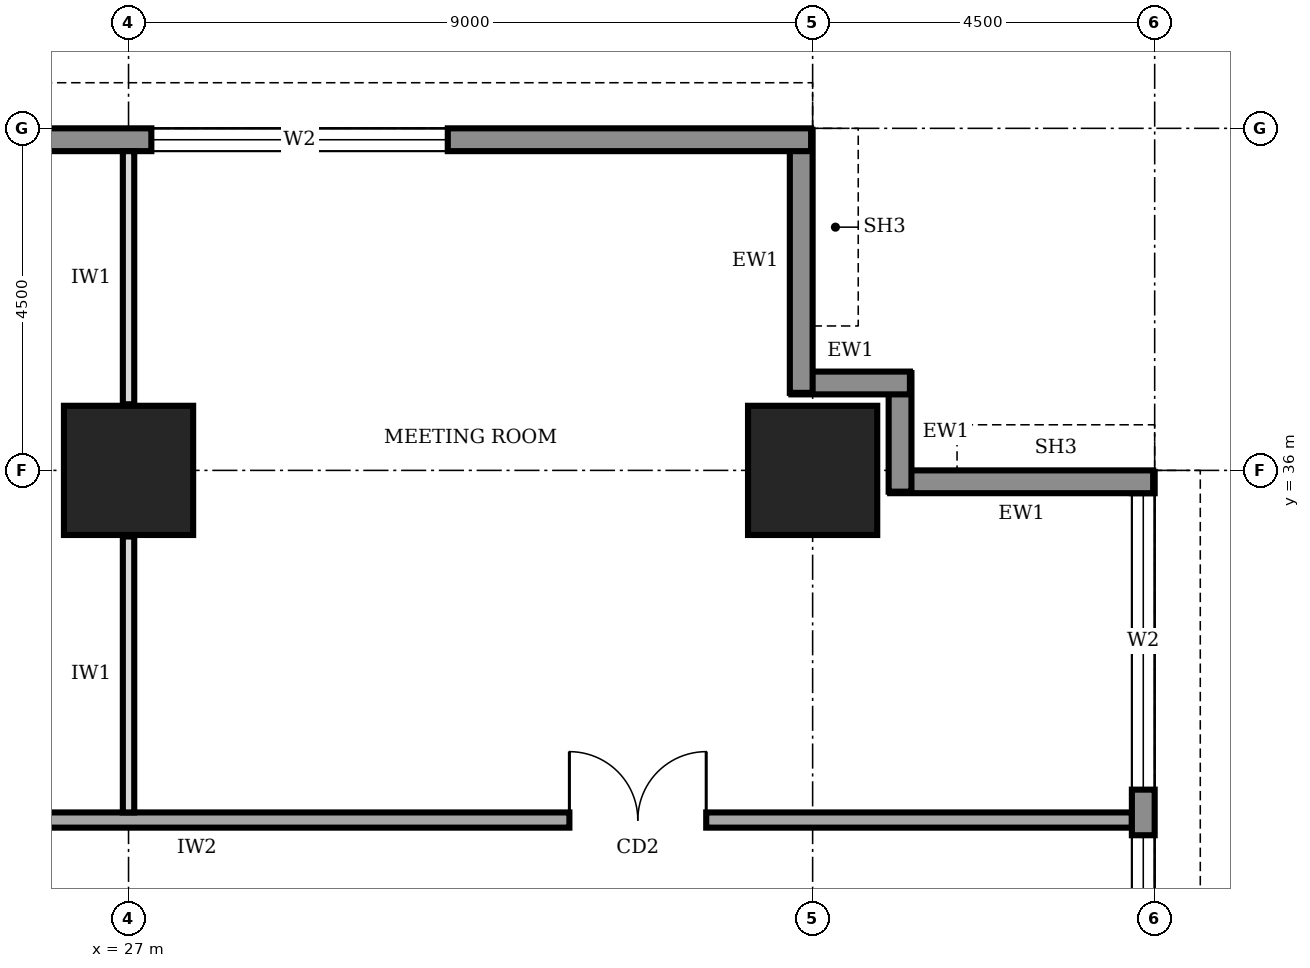
"""IFC4 building model, lengths in metres.
Left out: names, types, materials, properties, quantities, classifications, styles, units other than length and angle.
Written with IfcOpenShell. Run it as: python <this file> out.ifc"""

import sys

from ifc_helpers import new_model, si_unit, direction, frame, frame_2d, origin, origin_2d, place, context, subcontext, project, spatial, rectangle, extrude, element, fill, save


model = new_model("IFC4")
c1 = context("Model", 3, precision=1e-05, world=origin(), true_north=direction((0.0, 1.0)))
c2 = subcontext(c1, "Body", "Model", "MODEL_VIEW")
j1 = project(units=[si_unit("LENGTHUNIT", "METRE"), si_unit("PLANEANGLEUNIT", "RADIAN")], contexts=[c1])
p1 = place(None, origin())
s1 = spatial("IfcSite", under=j1, at=p1, CompositionType="ELEMENT")
p2 = place(p1, origin())
s2 = spatial("IfcBuilding", under=s1, at=p2, CompositionType="ELEMENT")
p3 = place(p2, frame((0.0, 0.0, 141.0)))
s3 = spatial("IfcBuildingStorey", under=s2, at=p3, CompositionType="ELEMENT", Elevation=141.0)
for number, where, z_axis, x_axis in (
    (1, (27.0, 36.0, 0.0), (0.0, 0.0, 1.0), (1.0, 0.0, 0.0)),
    (2, (36.0, 36.0, 0.0), (0.0, 0.0, 1.0), (1.0, 0.0, 0.0)),
):
    element("IfcColumn", number, at=place(p3, frame(where, z_axis=z_axis, x_axis=x_axis)), inside=s3, PredefinedType="COLUMN", context=c2, shape_type="SweptSolid", body=[
        extrude(rectangle(XDim=1.7, YDim=1.7, at=origin_2d()), origin(), (0.0, 0.0, 1.0), 4.0),
    ])
p4 = place(p3, frame((40.35, 4.52, 0.0), z_axis=(0.0, 0.0, 1.0), x_axis=(0.0, 1.0, 0.0)))
e3 = element("IfcWall", 3, at=p4, inside=s3, PredefinedType="STANDARD", context=c2, shape_type="SweptSolid", body=[
    extrude(rectangle(XDim=31.46, YDim=0.3, at=frame_2d((15.73, 0.0))), origin(), (0.0, 0.0, 1.0), 3.75),
])
p5 = place(p4, frame((4.78, 0.0, 0.6)))
e4 = element("IfcOpeningElement", 4, at=p5, cuts=e3, PredefinedType="OPENING", context=c2, shape_type="SweptSolid", body=[
    extrude(rectangle(XDim=3.9, YDim=2.6, at=frame_2d((1.95, 1.3))), frame((0.0, 0.16, 0.0), z_axis=(0.0, -1.0, 0.0), x_axis=(1.0, 0.0, 0.0)), (0.0, 0.0, 1.0), 0.32),
])
p6 = place(p4, frame((9.28, 0.0, 0.6)))
e5 = element("IfcOpeningElement", 5, at=p6, cuts=e3, PredefinedType="OPENING", context=c2, shape_type="SweptSolid", body=[
    extrude(rectangle(XDim=3.9, YDim=2.6, at=frame_2d((1.95, 1.3))), frame((0.0, 0.16, 0.0), z_axis=(0.0, -1.0, 0.0), x_axis=(1.0, 0.0, 0.0)), (0.0, 0.0, 1.0), 0.32),
])
p7 = place(p4, frame((13.78, 0.0, 0.6)))
e6 = element("IfcOpeningElement", 6, at=p7, cuts=e3, PredefinedType="OPENING", context=c2, shape_type="SweptSolid", body=[
    extrude(rectangle(XDim=3.9, YDim=2.6, at=frame_2d((1.95, 1.3))), frame((0.0, 0.16, 0.0), z_axis=(0.0, -1.0, 0.0), x_axis=(1.0, 0.0, 0.0)), (0.0, 0.0, 1.0), 0.32),
])
p8 = place(p4, frame((18.28, 0.0, 0.6)))
e7 = element("IfcOpeningElement", 7, at=p8, cuts=e3, PredefinedType="OPENING", context=c2, shape_type="SweptSolid", body=[
    extrude(rectangle(XDim=3.9, YDim=2.6, at=frame_2d((1.95, 1.3))), frame((0.0, 0.16, 0.0), z_axis=(0.0, -1.0, 0.0), x_axis=(1.0, 0.0, 0.0)), (0.0, 0.0, 1.0), 0.32),
])
p9 = place(p4, frame((22.78, 0.0, 0.6)))
e8 = element("IfcOpeningElement", 8, at=p9, cuts=e3, PredefinedType="OPENING", context=c2, shape_type="SweptSolid", body=[
    extrude(rectangle(XDim=3.9, YDim=2.6, at=frame_2d((1.95, 1.3))), frame((0.0, 0.16, 0.0), z_axis=(0.0, -1.0, 0.0), x_axis=(1.0, 0.0, 0.0)), (0.0, 0.0, 1.0), 0.32),
])
p10 = place(p4, frame((27.28, 0.0, 0.6)))
e9 = element("IfcOpeningElement", 9, at=p10, cuts=e3, PredefinedType="OPENING", context=c2, shape_type="SweptSolid", body=[
    extrude(rectangle(XDim=3.9, YDim=2.6, at=frame_2d((1.95, 1.3))), frame((0.0, 0.16, 0.0), z_axis=(0.0, -1.0, 0.0), x_axis=(1.0, 0.0, 0.0)), (0.0, 0.0, 1.0), 0.32),
])
p11 = place(p3, frame((40.48, 35.85, 0.0), z_axis=(0.0, 0.0, 1.0), x_axis=(-1.0, 0.0, 0.0)))
e10 = element("IfcWall", 10, at=p11, inside=s3, PredefinedType="STANDARD", context=c2, shape_type="SweptSolid", body=[
    extrude(rectangle(XDim=3.46, YDim=0.3, at=frame_2d((1.73, 0.0))), origin(), (0.0, 0.0, 1.0), 2.85),
])
for number, where, z_axis, x_axis in (
    (11, (37.15, 35.72, 0.0), (0.0, 0.0, 1.0), (0.0, 1.0, 0.0)),
    (12, (37.28, 37.15, 0.0), (0.0, 0.0, 1.0), (-1.0, 0.0, 0.0)),
):
    element("IfcWall", number, at=place(p3, frame(where, z_axis=z_axis, x_axis=x_axis)), inside=s3, PredefinedType="STANDARD", context=c2, shape_type="SweptSolid", body=[
        extrude(rectangle(XDim=1.56, YDim=0.3, at=frame_2d((0.78, 0.0))), origin(), (0.0, 0.0, 1.0), 3.75),
    ])
p12 = place(p3, frame((35.85, 37.02, 0.0), z_axis=(0.0, 0.0, 1.0), x_axis=(0.0, 1.0, 0.0)))
e13 = element("IfcWall", 13, at=p12, inside=s3, PredefinedType="STANDARD", context=c2, shape_type="SweptSolid", body=[
    extrude(rectangle(XDim=3.46, YDim=0.3, at=frame_2d((1.73, 0.0))), origin(), (0.0, 0.0, 1.0), 2.85),
])
p13 = place(p3, frame((35.98, 40.35, 0.0), z_axis=(0.0, 0.0, 1.0), x_axis=(-1.0, 0.0, 0.0)))
e14 = element("IfcWall", 14, at=p13, inside=s3, PredefinedType="STANDARD", context=c2, shape_type="SweptSolid", body=[
    extrude(rectangle(XDim=31.46, YDim=0.3, at=frame_2d((15.73, 0.0))), origin(), (0.0, 0.0, 1.0), 3.75),
])
p14 = place(p13, frame((27.28, 0.0, 0.6)))
e15 = element("IfcOpeningElement", 15, at=p14, cuts=e14, PredefinedType="OPENING", context=c2, shape_type="SweptSolid", body=[
    extrude(rectangle(XDim=3.9, YDim=2.6, at=frame_2d((1.95, 1.3))), frame((0.0, 0.16, 0.0), z_axis=(0.0, -1.0, 0.0), x_axis=(1.0, 0.0, 0.0)), (0.0, 0.0, 1.0), 0.32),
])
p15 = place(p13, frame((22.78, 0.0, 0.6)))
e16 = element("IfcOpeningElement", 16, at=p15, cuts=e14, PredefinedType="OPENING", context=c2, shape_type="SweptSolid", body=[
    extrude(rectangle(XDim=3.9, YDim=2.6, at=frame_2d((1.95, 1.3))), frame((0.0, 0.16, 0.0), z_axis=(0.0, -1.0, 0.0), x_axis=(1.0, 0.0, 0.0)), (0.0, 0.0, 1.0), 0.32),
])
p16 = place(p13, frame((4.78, 0.0, 0.6)))
e17 = element("IfcOpeningElement", 17, at=p16, cuts=e14, PredefinedType="OPENING", context=c2, shape_type="SweptSolid", body=[
    extrude(rectangle(XDim=3.9, YDim=2.6, at=frame_2d((1.95, 1.3))), frame((0.0, 0.16, 0.0), z_axis=(0.0, -1.0, 0.0), x_axis=(1.0, 0.0, 0.0)), (0.0, 0.0, 1.0), 0.32),
])
p17 = place(p3, frame((40.2, 31.4, 0.0), z_axis=(0.0, 0.0, 1.0), x_axis=(-1.0, 0.0, 0.0)))
e18 = element("IfcWall", 18, at=p17, inside=s3, PredefinedType="SOLIDWALL", context=c2, shape_type="SweptSolid", body=[
    extrude(rectangle(XDim=28.5, YDim=0.2, at=frame_2d((14.25, 0.0))), origin(), (0.0, 0.0, 1.0), 3.75),
])
p18 = place(p17, frame((27.2, 0.0, 0.0)))
e19 = element("IfcOpeningElement", 19, at=p18, cuts=e18, PredefinedType="OPENING", context=c2, shape_type="SweptSolid", body=[
    extrude(rectangle(XDim=1.0, YDim=2.1, at=frame_2d((0.5, 1.05))), frame((0.0, 0.11, 0.0), z_axis=(0.0, -1.0, 0.0), x_axis=(1.0, 0.0, 0.0)), (0.0, 0.0, 1.0), 0.22),
])
p19 = place(p17, frame((23.95, 0.0, 0.0)))
e20 = element("IfcOpeningElement", 20, at=p19, cuts=e18, PredefinedType="OPENING", context=c2, shape_type="SweptSolid", body=[
    extrude(rectangle(XDim=1.0, YDim=2.1, at=frame_2d((0.5, 1.05))), frame((0.0, 0.11, 0.0), z_axis=(0.0, -1.0, 0.0), x_axis=(1.0, 0.0, 0.0)), (0.0, 0.0, 1.0), 0.22),
])
p20 = place(p17, frame((17.2, 0.0, 0.0)))
e21 = element("IfcOpeningElement", 21, at=p20, cuts=e18, PredefinedType="OPENING", context=c2, shape_type="SweptSolid", body=[
    extrude(rectangle(XDim=1.0, YDim=2.1, at=frame_2d((0.5, 1.05))), frame((0.0, 0.11, 0.0), z_axis=(0.0, -1.0, 0.0), x_axis=(1.0, 0.0, 0.0)), (0.0, 0.0, 1.0), 0.22),
])
p21 = place(p17, frame((5.6, 0.0, 0.0)))
e22 = element("IfcOpeningElement", 22, at=p21, cuts=e18, PredefinedType="OPENING", context=c2, shape_type="SweptSolid", body=[
    extrude(rectangle(XDim=1.8, YDim=2.1, at=frame_2d((0.9, 1.05))), frame((0.0, 0.11, 0.0), z_axis=(0.0, -1.0, 0.0), x_axis=(1.0, 0.0, 0.0)), (0.0, 0.0, 1.0), 0.22),
])
p22 = place(p3, frame((27.0, 31.5, 0.0), z_axis=(0.0, 0.0, 1.0), x_axis=(0.0, 1.0, 0.0)))
e23 = element("IfcWall", 23, at=p22, inside=s3, PredefinedType="PARTITIONING", context=c2, shape_type="SweptSolid", body=[
    extrude(rectangle(XDim=3.63, YDim=0.15, at=frame_2d((1.815, 0.0))), origin(), (0.0, 0.0, 1.0), 2.85),
])
p23 = place(p3, frame((27.0, 36.87, 0.0), z_axis=(0.0, 0.0, 1.0), x_axis=(0.0, 1.0, 0.0)))
e24 = element("IfcWall", 24, at=p23, inside=s3, PredefinedType="PARTITIONING", context=c2, shape_type="SweptSolid", body=[
    extrude(rectangle(XDim=3.33, YDim=0.15, at=frame_2d((1.665, 0.0))), origin(), (0.0, 0.0, 1.0), 2.85),
])
p24 = place(p9, origin())
e25 = element("IfcWindow", 25, at=p24, inside=s3, PartitioningType="SINGLE_PANEL", PredefinedType="WINDOW", context=c2, shape_type="SweptSolid", body=[
    extrude(rectangle(XDim=3.9, YDim=2.6, at=frame_2d((1.95, 1.3))), frame((0.0, 0.03, 0.0), z_axis=(0.0, -1.0, 0.0), x_axis=(1.0, 0.0, 0.0)), (0.0, 0.0, 1.0), 0.06),
])
fill(e8, e25)
p25 = place(p10, origin())
e26 = element("IfcWindow", 26, at=p25, inside=s3, PartitioningType="SINGLE_PANEL", PredefinedType="WINDOW", context=c2, shape_type="SweptSolid", body=[
    extrude(rectangle(XDim=3.9, YDim=2.6, at=frame_2d((1.95, 1.3))), frame((0.0, 0.03, 0.0), z_axis=(0.0, -1.0, 0.0), x_axis=(1.0, 0.0, 0.0)), (0.0, 0.0, 1.0), 0.06),
])
fill(e9, e26)
p26 = place(p16, origin())
e27 = element("IfcWindow", 27, at=p26, inside=s3, PartitioningType="SINGLE_PANEL", PredefinedType="WINDOW", context=c2, shape_type="SweptSolid", body=[
    extrude(rectangle(XDim=3.9, YDim=2.6, at=frame_2d((1.95, 1.3))), frame((0.0, 0.03, 0.0), z_axis=(0.0, -1.0, 0.0), x_axis=(1.0, 0.0, 0.0)), (0.0, 0.0, 1.0), 0.06),
])
fill(e17, e27)
p27 = place(p21, frame((1.8, 0.0, 0.0), z_axis=(0.0, 0.0, 1.0), x_axis=(-1.0, 0.0, 0.0)))
e28 = element("IfcDoor", 28, at=p27, inside=s3, OperationType="DOUBLE_DOOR_SINGLE_SWING", PredefinedType="DOOR", context=c2, shape_type="SweptSolid", body=[
    extrude(rectangle(XDim=1.8, YDim=2.1, at=frame_2d((0.9, 1.05))), frame((0.0, 0.025, 0.0), z_axis=(0.0, -1.0, 0.0), x_axis=(1.0, 0.0, 0.0)), (0.0, 0.0, 1.0), 0.05),
])
fill(e22, e28)
save(model, sys.argv[1])
